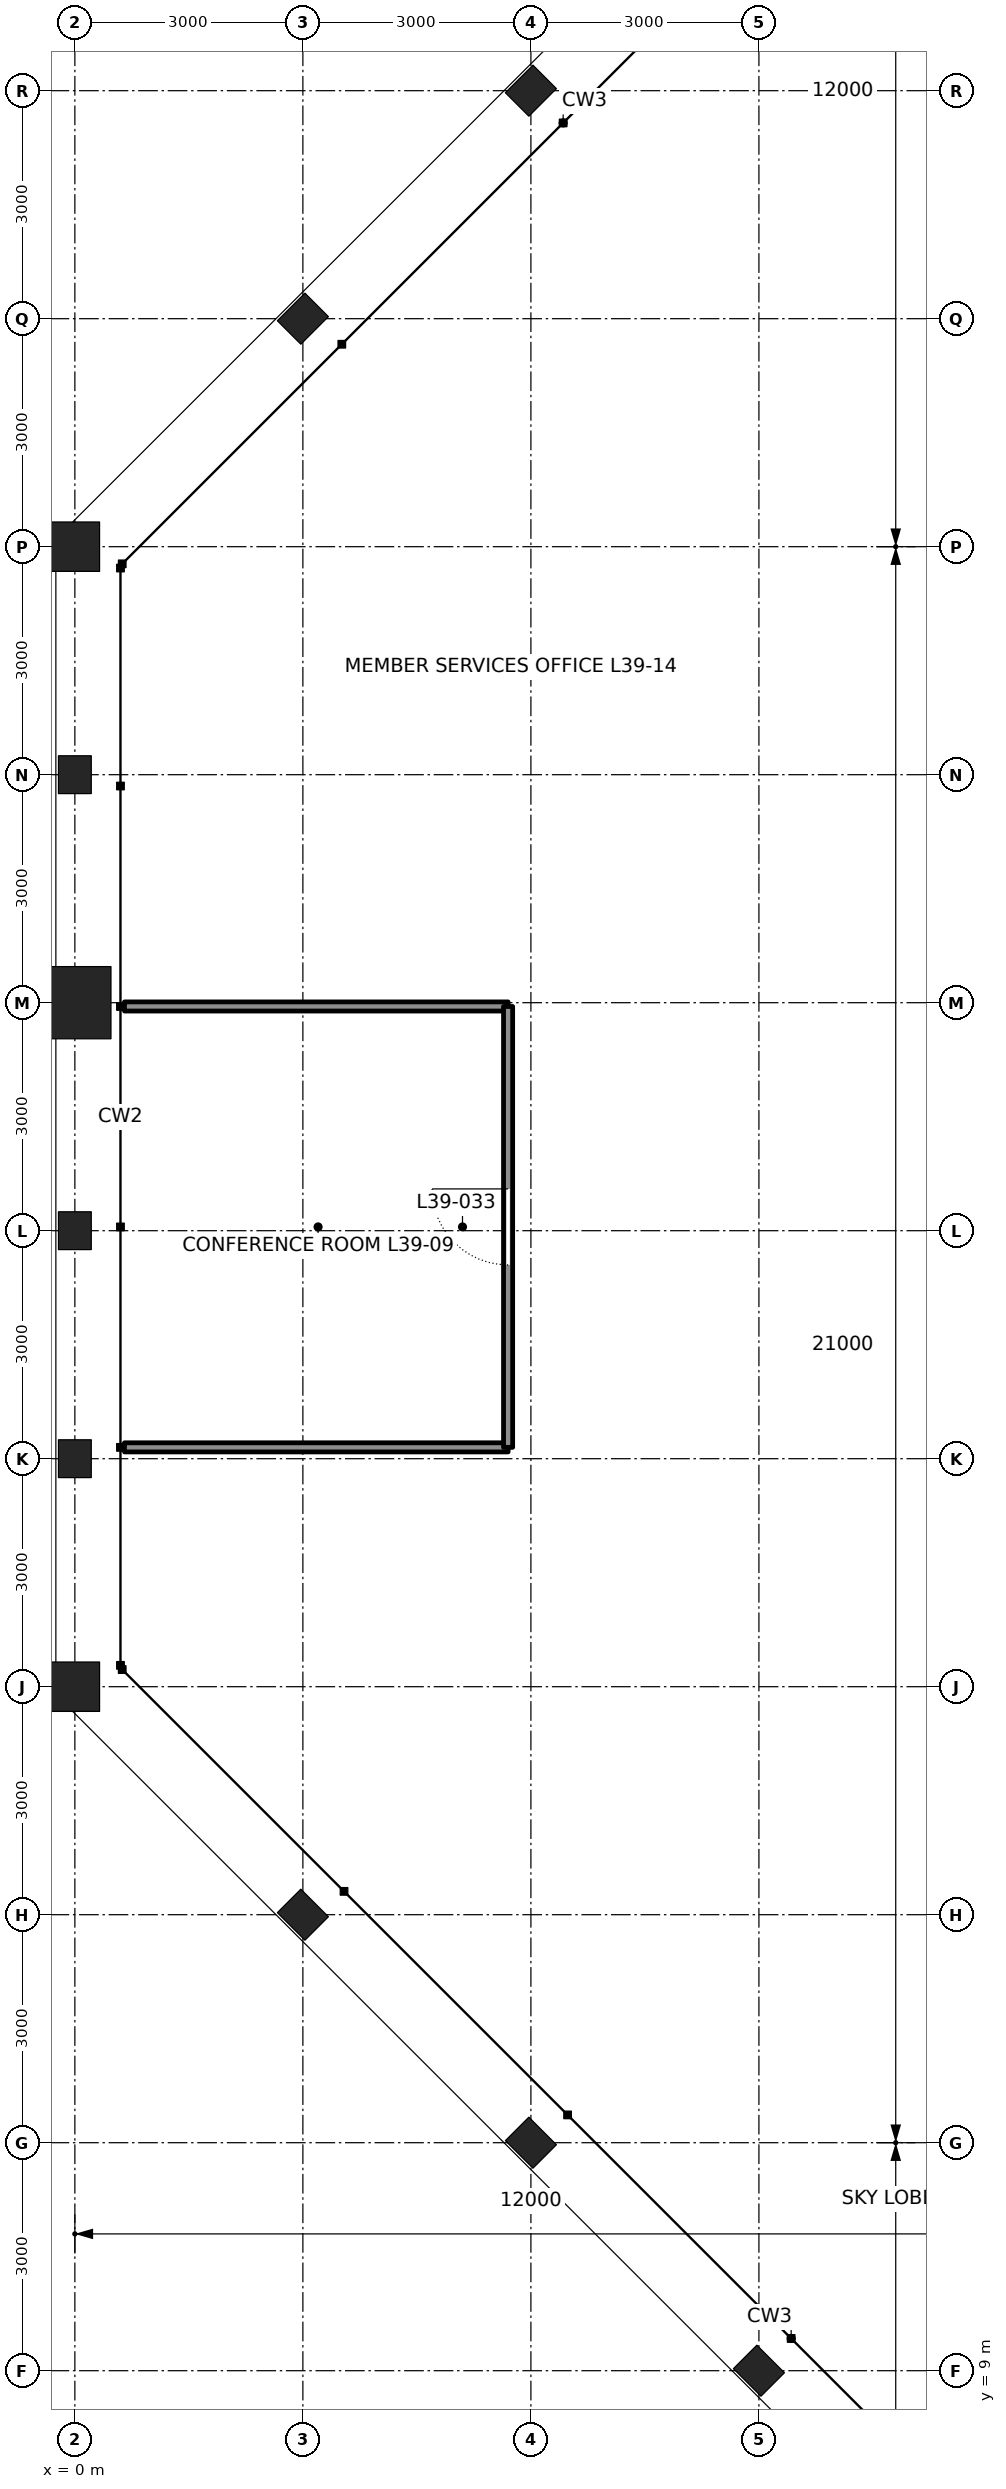
"""IFC4 building model, lengths in metres.
Left out: names, types, materials, properties, quantities, classifications, styles, units other than length and angle.
Written with IfcOpenShell. Run it as: python <this file> out.ifc"""

import sys

from ifc_helpers import new_model, si_unit, direction, frame, frame_2d, origin, origin_2d, place, context, subcontext, project, spatial, rectangle, hollow_rectangle, i_section, extrude, element, fill, save


model = new_model("IFC4")
c1 = context("Model", 3, precision=1e-05, world=origin(), true_north=direction((0.0, 1.0)))
c2 = subcontext(c1, "Body", "Model", "MODEL_VIEW")
j1 = project(units=[si_unit("LENGTHUNIT", "METRE"), si_unit("PLANEANGLEUNIT", "RADIAN")], contexts=[c1])
p1 = place(None, origin())
s1 = spatial("IfcSite", under=j1, at=p1, CompositionType="ELEMENT")
p2 = place(p1, origin())
s2 = spatial("IfcBuilding", under=s1, at=p2, CompositionType="ELEMENT")
p3 = place(p2, frame((0.0, 0.0, 180.0)))
s3 = spatial("IfcBuildingStorey", under=s2, at=p3, CompositionType="ELEMENT", Elevation=180.0)
for number, where, z_axis, x_axis in (
    (1, (6.0, 39.0, -0.91), (0.0, 0.0, 1.0), (-0.707, 0.707, 0.0)),
    (2, (3.0, 36.0, -0.91), (0.0, 0.0, 1.0), (-0.707, 0.707, 0.0)),
):
    element("IfcColumn", number, at=place(p3, frame(where, z_axis=z_axis, x_axis=x_axis)), inside=s3, PredefinedType="COLUMN", context=c2, shape_type="SweptSolid", body=[
        extrude(i_section(OverallWidth=0.437, OverallDepth=0.513, WebThickness=0.061, FlangeThickness=0.097, at=origin_2d()), origin(), (0.0, 0.0, 1.0), 5.41),
    ])
p4 = place(p3, frame((0.0, 33.0, 0.0), z_axis=(0.0, 0.0, 1.0), x_axis=(-1.0, 0.0, 0.0)))
e3 = element("IfcColumn", 3, at=p4, inside=s3, PredefinedType="COLUMN", context=c2, shape_type="SweptSolid", body=[
    extrude(hollow_rectangle(XDim=0.65, YDim=0.65, WallThickness=0.065, at=origin_2d()), origin(), (0.0, 0.0, 1.0), 4.5),
])
p5 = place(p3, frame((0.0, 30.0, 0.0), z_axis=(0.0, 0.0, 1.0), x_axis=(-1.0, 0.0, 0.0)))
e4 = element("IfcColumn", 4, at=p5, inside=s3, PredefinedType="COLUMN", context=c2, shape_type="SweptSolid", body=[
    extrude(i_section(OverallWidth=0.432, OverallDepth=0.498, WebThickness=0.056, FlangeThickness=0.089, at=origin_2d()), origin(), (0.0, 0.0, 1.0), 4.5),
])
p6 = place(p3, frame((0.0, 27.0, 0.0), z_axis=(0.0, 0.0, 1.0), x_axis=(-1.0, 0.0, 0.0)))
e5 = element("IfcColumn", 5, at=p6, inside=s3, PredefinedType="COLUMN", context=c2, shape_type="SweptSolid", body=[
    extrude(hollow_rectangle(XDim=0.95, YDim=0.95, WallThickness=0.11, at=origin_2d()), origin(), (0.0, 0.0, 1.0), 4.5),
])
for number, where, z_axis, x_axis in (
    (6, (0.0, 24.0, 0.0), (0.0, 0.0, 1.0), (-1.0, 0.0, 0.0)),
    (7, (0.0, 21.0, 0.0), (0.0, 0.0, 1.0), (-1.0, 0.0, 0.0)),
):
    element("IfcColumn", number, at=place(p3, frame(where, z_axis=z_axis, x_axis=x_axis)), inside=s3, PredefinedType="COLUMN", context=c2, shape_type="SweptSolid", body=[
        extrude(i_section(OverallWidth=0.432, OverallDepth=0.498, WebThickness=0.056, FlangeThickness=0.089, at=origin_2d()), origin(), (0.0, 0.0, 1.0), 4.5),
    ])
p7 = place(p3, frame((0.0, 18.0, 0.0), z_axis=(0.0, 0.0, 1.0), x_axis=(-1.0, 0.0, 0.0)))
e8 = element("IfcColumn", 8, at=p7, inside=s3, PredefinedType="COLUMN", context=c2, shape_type="SweptSolid", body=[
    extrude(hollow_rectangle(XDim=0.65, YDim=0.65, WallThickness=0.065, at=origin_2d()), origin(), (0.0, 0.0, 1.0), 4.5),
])
for number, where, z_axis, x_axis in (
    (9, (3.0, 15.0, 0.0), (0.0, 0.0, 1.0), (-0.707, -0.707, 0.0)),
    (10, (6.0, 12.0, 0.0), (0.0, 0.0, 1.0), (-0.707, -0.707, 0.0)),
    (11, (9.0, 9.0, 0.0), (0.0, 0.0, 1.0), (-0.707, -0.707, 0.0)),
):
    element("IfcColumn", number, at=place(p3, frame(where, z_axis=z_axis, x_axis=x_axis)), inside=s3, PredefinedType="COLUMN", context=c2, shape_type="SweptSolid", body=[
        extrude(i_section(OverallWidth=0.437, OverallDepth=0.513, WebThickness=0.061, FlangeThickness=0.097, at=origin_2d()), origin(), (0.0, 0.0, 1.0), 4.5),
    ])
p8 = place(p3, frame((0.653, 21.149, 0.0), z_axis=(0.0, 0.0, 1.0), x_axis=(1.0, 0.0, 0.0)))
e12 = element("IfcWall", 12, at=p8, inside=s3, PredefinedType="PARTITIONING", context=c2, shape_type="SweptSolid", body=[
    extrude(rectangle(XDim=5.047, YDim=0.12, at=frame_2d((2.524, 0.0))), origin(), (0.0, 0.0, 1.0), 4.34),
])
p9 = place(p3, frame((0.653, 26.95, 0.0), z_axis=(0.0, 0.0, 1.0), x_axis=(1.0, 0.0, 0.0)))
e13 = element("IfcWall", 13, at=p9, inside=s3, PredefinedType="PARTITIONING", context=c2, shape_type="SweptSolid", body=[
    extrude(rectangle(XDim=5.047, YDim=0.12, at=frame_2d((2.524, 0.0))), origin(), (0.0, 0.0, 1.0), 3.657),
])
p10 = place(p3, frame((5.7, 21.149, 0.0), z_axis=(0.0, 0.0, 1.0), x_axis=(0.0, 1.0, 0.0)))
e14 = element("IfcWall", 14, at=p10, inside=s3, PredefinedType="PARTITIONING", context=c2, shape_type="SweptSolid", body=[
    extrude(rectangle(XDim=5.801, YDim=0.12, at=frame_2d((2.9, 0.0))), origin(), (0.0, 0.0, 1.0), 4.34),
])
p11 = place(p10, frame((2.401, 0.0, 0.0)))
e15 = element("IfcOpeningElement", 15, at=p11, cuts=e14, PredefinedType="OPENING", context=c2, shape_type="SweptSolid", body=[
    extrude(rectangle(XDim=1.0, YDim=2.4, at=frame_2d((0.5, 1.2))), frame((0.0, 0.07, 0.0), z_axis=(0.0, -1.0, 0.0), x_axis=(1.0, 0.0, 0.0)), (0.0, 0.0, 1.0), 0.14),
])
p12 = place(p11, origin())
e16 = element("IfcDoor", 16, at=p12, inside=s3, OperationType="SINGLE_SWING_RIGHT", PredefinedType="DOOR", context=c2, shape_type="SweptSolid", body=[
    extrude(rectangle(XDim=1.0, YDim=2.4, at=frame_2d((0.5, 1.2))), frame((0.0, 0.025, 0.0), z_axis=(0.0, -1.0, 0.0), x_axis=(1.0, 0.0, 0.0)), (0.0, 0.0, 1.0), 0.05),
])
fill(e15, e16)
save(model, sys.argv[1])
